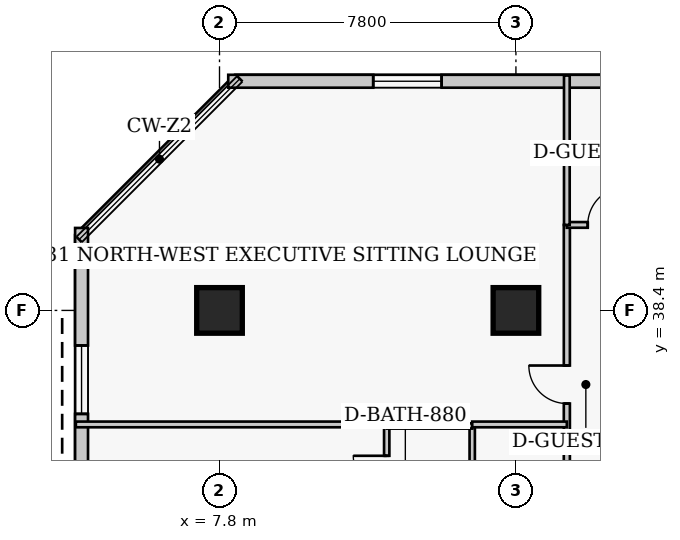
"""IFC4 building model, lengths in metres.
Left out: names, types, materials, properties, quantities, classifications, styles, units other than length and angle.
Written with IfcOpenShell. Run it as: python <this file> out.ifc"""

import sys

from ifc_helpers import new_model, si_unit, direction, frame, frame_2d, origin, origin_2d, place, context, subcontext, project, spatial, rectangle, extrude, element, fill, save


model = new_model("IFC4")
c1 = context("Model", 3, precision=1e-05, world=origin(), true_north=direction((0.0, 1.0)))
c2 = subcontext(c1, "Body", "Model", "MODEL_VIEW")
j1 = project(units=[si_unit("LENGTHUNIT", "METRE"), si_unit("PLANEANGLEUNIT", "RADIAN")], contexts=[c1])
p1 = place(None, origin())
s1 = spatial("IfcSite", under=j1, at=p1, CompositionType="ELEMENT")
p2 = place(p1, origin())
s2 = spatial("IfcBuilding", under=s1, at=p2, CompositionType="ELEMENT")
p3 = place(p2, frame((0.0, 0.0, 126.0)))
s3 = spatial("IfcBuildingStorey", under=s2, at=p3, CompositionType="ELEMENT", Elevation=126.0)
for number, where, z_axis, x_axis in (
    (1, (7.8, 38.4, 0.0), (0.0, 0.0, 1.0), (1.0, 0.0, 0.0)),
    (2, (15.6, 38.4, 0.0), (0.0, 0.0, 1.0), (1.0, 0.0, 0.0)),
):
    element("IfcColumn", number, at=place(p3, frame(where, z_axis=z_axis, x_axis=x_axis)), inside=s3, PredefinedType="COLUMN", context=c2, shape_type="SweptSolid", body=[
        extrude(rectangle(XDim=1.2, YDim=1.2, at=origin_2d()), origin(), (0.0, 0.0, 1.0), 3.8),
    ])
p4 = place(p3, frame((36.32, 44.43, 0.0), z_axis=(0.0, 0.0, 1.0), x_axis=(-1.0, 0.0, 0.0)))
e3 = element("IfcWall", 3, at=p4, inside=s3, PredefinedType="SOLIDWALL", context=c2, shape_type="SweptSolid", body=[
    extrude(rectangle(XDim=28.29, YDim=0.34, at=frame_2d((14.145, 0.0))), origin(), (0.0, 0.0, 1.0), 3.46),
])
p5 = place(p4, frame((3.815, 0.0, 0.85)))
e4 = element("IfcOpeningElement", 4, at=p5, cuts=e3, PredefinedType="OPENING", context=c2, shape_type="SweptSolid", body=[
    extrude(rectangle(XDim=1.8, YDim=1.8, at=frame_2d((0.9, 0.9))), frame((0.0, 0.18, 0.0), z_axis=(0.0, -1.0, 0.0), x_axis=(1.0, 0.0, 0.0)), (0.0, 0.0, 1.0), 0.36),
])
p6 = place(p4, frame((13.245, 0.0, 0.85)))
e5 = element("IfcOpeningElement", 5, at=p6, cuts=e3, PredefinedType="OPENING", context=c2, shape_type="SweptSolid", body=[
    extrude(rectangle(XDim=1.8, YDim=1.8, at=frame_2d((0.9, 0.9))), frame((0.0, 0.18, 0.0), z_axis=(0.0, -1.0, 0.0), x_axis=(1.0, 0.0, 0.0)), (0.0, 0.0, 1.0), 0.36),
])
p7 = place(p4, frame((22.675, 0.0, 0.85)))
e6 = element("IfcOpeningElement", 6, at=p7, cuts=e3, PredefinedType="OPENING", context=c2, shape_type="SweptSolid", body=[
    extrude(rectangle(XDim=1.8, YDim=1.8, at=frame_2d((0.9, 0.9))), frame((0.0, 0.18, 0.0), z_axis=(0.0, -1.0, 0.0), x_axis=(1.0, 0.0, 0.0)), (0.0, 0.0, 1.0), 0.36),
])
p8 = place(p3, frame((4.17, 40.57, 0.0), z_axis=(0.0, 0.0, 1.0), x_axis=(0.0, -1.0, 0.0)))
e7 = element("IfcWall", 7, at=p8, inside=s3, PredefinedType="SOLIDWALL", context=c2, shape_type="SweptSolid", body=[
    extrude(rectangle(XDim=31.94, YDim=0.34, at=frame_2d((15.97, 0.0))), origin(), (0.0, 0.0, 1.0), 3.46),
])
p9 = place(p8, frame((3.093, 0.0, 0.85)))
e8 = element("IfcOpeningElement", 8, at=p9, cuts=e7, PredefinedType="OPENING", context=c2, shape_type="SweptSolid", body=[
    extrude(rectangle(XDim=1.8, YDim=1.8, at=frame_2d((0.9, 0.9))), frame((0.0, 0.18, 0.0), z_axis=(0.0, -1.0, 0.0), x_axis=(1.0, 0.0, 0.0)), (0.0, 0.0, 1.0), 0.36),
])
p10 = place(p8, frame((12.228, 0.0, 0.85)))
e9 = element("IfcOpeningElement", 9, at=p10, cuts=e7, PredefinedType="OPENING", context=c2, shape_type="SweptSolid", body=[
    extrude(rectangle(XDim=1.8, YDim=1.8, at=frame_2d((0.9, 0.9))), frame((0.0, 0.18, 0.0), z_axis=(0.0, -1.0, 0.0), x_axis=(1.0, 0.0, 0.0)), (0.0, 0.0, 1.0), 0.36),
])
p11 = place(p8, frame((18.413, 0.0, 0.85)))
e10 = element("IfcOpeningElement", 10, at=p11, cuts=e7, PredefinedType="OPENING", context=c2, shape_type="SweptSolid", body=[
    extrude(rectangle(XDim=1.8, YDim=1.8, at=frame_2d((0.9, 0.9))), frame((0.0, 0.18, 0.0), z_axis=(0.0, -1.0, 0.0), x_axis=(1.0, 0.0, 0.0)), (0.0, 0.0, 1.0), 0.36),
])
p12 = place(p8, frame((27.048, 0.0, 0.85)))
e11 = element("IfcOpeningElement", 11, at=p12, cuts=e7, PredefinedType="OPENING", context=c2, shape_type="SweptSolid", body=[
    extrude(rectangle(XDim=1.8, YDim=1.8, at=frame_2d((0.9, 0.9))), frame((0.0, 0.18, 0.0), z_axis=(0.0, -1.0, 0.0), x_axis=(1.0, 0.0, 0.0)), (0.0, 0.0, 1.0), 0.36),
])
p13 = place(p8, frame((7.81, 0.0, 0.85)))
e12 = element("IfcOpeningElement", 12, at=p13, cuts=e7, PredefinedType="OPENING", context=c2, shape_type="SweptSolid", body=[
    extrude(rectangle(XDim=1.3, YDim=1.7, at=frame_2d((0.65, 0.85))), frame((0.0, 0.18, 0.0), z_axis=(0.0, -1.0, 0.0), x_axis=(1.0, 0.0, 0.0)), (0.0, 0.0, 1.0), 0.36),
])
p14 = place(p3, frame((16.94, 6.65, 0.0), z_axis=(0.0, 0.0, 1.0), x_axis=(0.0, 1.0, 0.0)))
e13 = element("IfcWall", 13, at=p14, inside=s3, PredefinedType="PARTITIONING", context=c2, shape_type="SweptSolid", body=[
    extrude(rectangle(XDim=34.0, YDim=0.16, at=frame_2d((17.0, 0.0))), origin(), (0.0, 0.0, 1.0), 3.46),
])
p15 = place(p14, frame((1.8, 0.0, 0.0)))
e14 = element("IfcOpeningElement", 14, at=p15, cuts=e13, PredefinedType="OPENING", context=c2, shape_type="SweptSolid", body=[
    extrude(rectangle(XDim=0.95, YDim=2.1, at=frame_2d((0.475, 1.05))), frame((0.0, 0.09, 0.0), z_axis=(0.0, -1.0, 0.0), x_axis=(1.0, 0.0, 0.0)), (0.0, 0.0, 1.0), 0.18),
])
p16 = place(p14, frame((8.475, 0.0, 0.0)))
e15 = element("IfcOpeningElement", 15, at=p16, cuts=e13, PredefinedType="OPENING", context=c2, shape_type="SweptSolid", body=[
    extrude(rectangle(XDim=0.95, YDim=2.1, at=frame_2d((0.475, 1.05))), frame((0.0, 0.09, 0.0), z_axis=(0.0, -1.0, 0.0), x_axis=(1.0, 0.0, 0.0)), (0.0, 0.0, 1.0), 0.18),
])
p17 = place(p14, frame((17.275, 0.0, 0.0)))
e16 = element("IfcOpeningElement", 16, at=p17, cuts=e13, PredefinedType="OPENING", context=c2, shape_type="SweptSolid", body=[
    extrude(rectangle(XDim=0.95, YDim=2.1, at=frame_2d((0.475, 1.05))), frame((0.0, 0.09, 0.0), z_axis=(0.0, -1.0, 0.0), x_axis=(1.0, 0.0, 0.0)), (0.0, 0.0, 1.0), 0.18),
])
p18 = place(p14, frame((24.975, 0.0, 0.0)))
e17 = element("IfcOpeningElement", 17, at=p18, cuts=e13, PredefinedType="OPENING", context=c2, shape_type="SweptSolid", body=[
    extrude(rectangle(XDim=0.95, YDim=2.1, at=frame_2d((0.475, 1.05))), frame((0.0, 0.09, 0.0), z_axis=(0.0, -1.0, 0.0), x_axis=(1.0, 0.0, 0.0)), (0.0, 0.0, 1.0), 0.18),
])
p19 = place(p14, frame((29.3, 0.0, 0.0)))
e18 = element("IfcOpeningElement", 18, at=p19, cuts=e13, PredefinedType="OPENING", context=c2, shape_type="SweptSolid", body=[
    extrude(rectangle(XDim=1.0, YDim=2.15, at=frame_2d((0.5, 1.075))), frame((0.0, 0.09, 0.0), z_axis=(0.0, -1.0, 0.0), x_axis=(1.0, 0.0, 0.0)), (0.0, 0.0, 1.0), 0.18),
])
p20 = place(p3, frame((16.94, 40.65, 0.0), z_axis=(0.0, 0.0, 1.0), x_axis=(1.0, 0.0, 0.0)))
e19 = element("IfcWall", 19, at=p20, inside=s3, PredefinedType="PARTITIONING", context=c2, shape_type="SweptSolid", body=[
    extrude(rectangle(XDim=5.16, YDim=0.15, at=frame_2d((2.58, 0.0))), origin(), (0.0, 0.0, 1.0), 3.46),
])
p21 = place(p20, frame((0.55, 0.0, 0.0)))
e20 = element("IfcOpeningElement", 20, at=p21, cuts=e19, PredefinedType="OPENING", context=c2, shape_type="SweptSolid", body=[
    extrude(rectangle(XDim=1.0, YDim=2.15, at=frame_2d((0.5, 1.075))), frame((0.0, 0.085, 0.0), z_axis=(0.0, -1.0, 0.0), x_axis=(1.0, 0.0, 0.0)), (0.0, 0.0, 1.0), 0.17),
])
p22 = place(p3, frame((16.94, 40.65, 0.0), z_axis=(0.0, 0.0, 1.0), x_axis=(0.0, 1.0, 0.0)))
e21 = element("IfcWall", 21, at=p22, inside=s3, PredefinedType="PARTITIONING", context=c2, shape_type="SweptSolid", body=[
    extrude(rectangle(XDim=3.93, YDim=0.15, at=frame_2d((1.965, 0.0))), origin(), (0.0, 0.0, 1.0), 3.46),
])
p23 = place(p3, frame((12.2, 32.91, 0.0), z_axis=(0.0, 0.0, 1.0), x_axis=(0.0, 1.0, 0.0)))
e22 = element("IfcWall", 22, at=p23, inside=s3, PredefinedType="PLUMBINGWALL", context=c2, shape_type="SweptSolid", body=[
    extrude(rectangle(XDim=2.45, YDim=0.14, at=frame_2d((1.225, 0.0))), origin(), (0.0, 0.0, 1.0), 3.46),
])
p24 = place(p23, frame((0.785, 0.0, 0.0)))
e23 = element("IfcOpeningElement", 23, at=p24, cuts=e22, PredefinedType="OPENING", context=c2, shape_type="SweptSolid", body=[
    extrude(rectangle(XDim=0.88, YDim=2.05, at=frame_2d((0.44, 1.025))), frame((0.0, 0.08, 0.0), z_axis=(0.0, -1.0, 0.0), x_axis=(1.0, 0.0, 0.0)), (0.0, 0.0, 1.0), 0.16),
])
p25 = place(p3, frame((14.45, 32.91, 0.0), z_axis=(0.0, 0.0, 1.0), x_axis=(0.0, 1.0, 0.0)))
e24 = element("IfcWall", 24, at=p25, inside=s3, PredefinedType="PLUMBINGWALL", context=c2, shape_type="SweptSolid", body=[
    extrude(rectangle(XDim=2.45, YDim=0.14, at=frame_2d((1.225, 0.0))), origin(), (0.0, 0.0, 1.0), 3.46),
])
p26 = place(p3, frame((12.2, 35.36, 0.0), z_axis=(0.0, 0.0, 1.0), x_axis=(1.0, 0.0, 0.0)))
e25 = element("IfcWall", 25, at=p26, inside=s3, PredefinedType="PLUMBINGWALL", context=c2, shape_type="SweptSolid", body=[
    extrude(rectangle(XDim=2.25, YDim=0.14, at=frame_2d((1.125, 0.0))), origin(), (0.0, 0.0, 1.0), 3.46),
])
p27 = place(p3, frame((4.02, 35.4, 0.0), z_axis=(0.0, 0.0, 1.0), x_axis=(1.0, 0.0, 0.0)))
e26 = element("IfcWall", 26, at=p27, inside=s3, PredefinedType="PARTITIONING", context=c2, shape_type="SweptSolid", body=[
    extrude(rectangle(XDim=8.18, YDim=0.15, at=frame_2d((4.09, 0.0))), origin(), (0.0, 0.0, 1.0), 3.46),
])
p28 = place(p3, frame((14.45, 35.4, 0.0), z_axis=(0.0, 0.0, 1.0), x_axis=(1.0, 0.0, 0.0)))
e27 = element("IfcWall", 27, at=p28, inside=s3, PredefinedType="PARTITIONING", context=c2, shape_type="SweptSolid", body=[
    extrude(rectangle(XDim=2.49, YDim=0.15, at=frame_2d((1.245, 0.0))), origin(), (0.0, 0.0, 1.0), 3.46),
])
p29 = place(p7, origin())
e28 = element("IfcWindow", 28, at=p29, inside=s3, PartitioningType="SINGLE_PANEL", PredefinedType="WINDOW", context=c2, shape_type="SweptSolid", body=[
    extrude(rectangle(XDim=1.8, YDim=1.8, at=frame_2d((0.9, 0.9))), frame((0.0, 0.03, 0.0), z_axis=(0.0, -1.0, 0.0), x_axis=(1.0, 0.0, 0.0)), (0.0, 0.0, 1.0), 0.06),
])
fill(e6, e28)
p30 = place(p9, origin())
e29 = element("IfcWindow", 29, at=p30, inside=s3, PartitioningType="SINGLE_PANEL", PredefinedType="WINDOW", context=c2, shape_type="SweptSolid", body=[
    extrude(rectangle(XDim=1.8, YDim=1.8, at=frame_2d((0.9, 0.9))), frame((0.0, 0.03, 0.0), z_axis=(0.0, -1.0, 0.0), x_axis=(1.0, 0.0, 0.0)), (0.0, 0.0, 1.0), 0.06),
])
fill(e8, e29)
p31 = place(p21, origin())
e30 = element("IfcDoor", 30, at=p31, inside=s3, OperationType="SINGLE_SWING_RIGHT", PredefinedType="DOOR", context=c2, shape_type="SweptSolid", body=[
    extrude(rectangle(XDim=1.0, YDim=2.15, at=frame_2d((0.5, 1.075))), frame((0.0, 0.025, 0.0), z_axis=(0.0, -1.0, 0.0), x_axis=(1.0, 0.0, 0.0)), (0.0, 0.0, 1.0), 0.05),
])
fill(e20, e30)
p32 = place(p24, origin())
e31 = element("IfcDoor", 31, at=p32, inside=s3, OperationType="SINGLE_SWING_RIGHT", PredefinedType="DOOR", context=c2, shape_type="SweptSolid", body=[
    extrude(rectangle(XDim=0.88, YDim=2.05, at=frame_2d((0.44, 1.025))), frame((0.0, 0.025, 0.0), z_axis=(0.0, -1.0, 0.0), x_axis=(1.0, 0.0, 0.0)), (0.0, 0.0, 1.0), 0.05),
])
fill(e23, e31)
p33 = place(p19, origin())
e32 = element("IfcDoor", 32, at=p33, inside=s3, OperationType="SINGLE_SWING_RIGHT", PredefinedType="DOOR", context=c2, shape_type="SweptSolid", body=[
    extrude(rectangle(XDim=1.0, YDim=2.15, at=frame_2d((0.5, 1.075))), frame((0.0, 0.025, 0.0), z_axis=(0.0, -1.0, 0.0), x_axis=(1.0, 0.0, 0.0)), (0.0, 0.0, 1.0), 0.05),
])
fill(e18, e32)
save(model, sys.argv[1])
